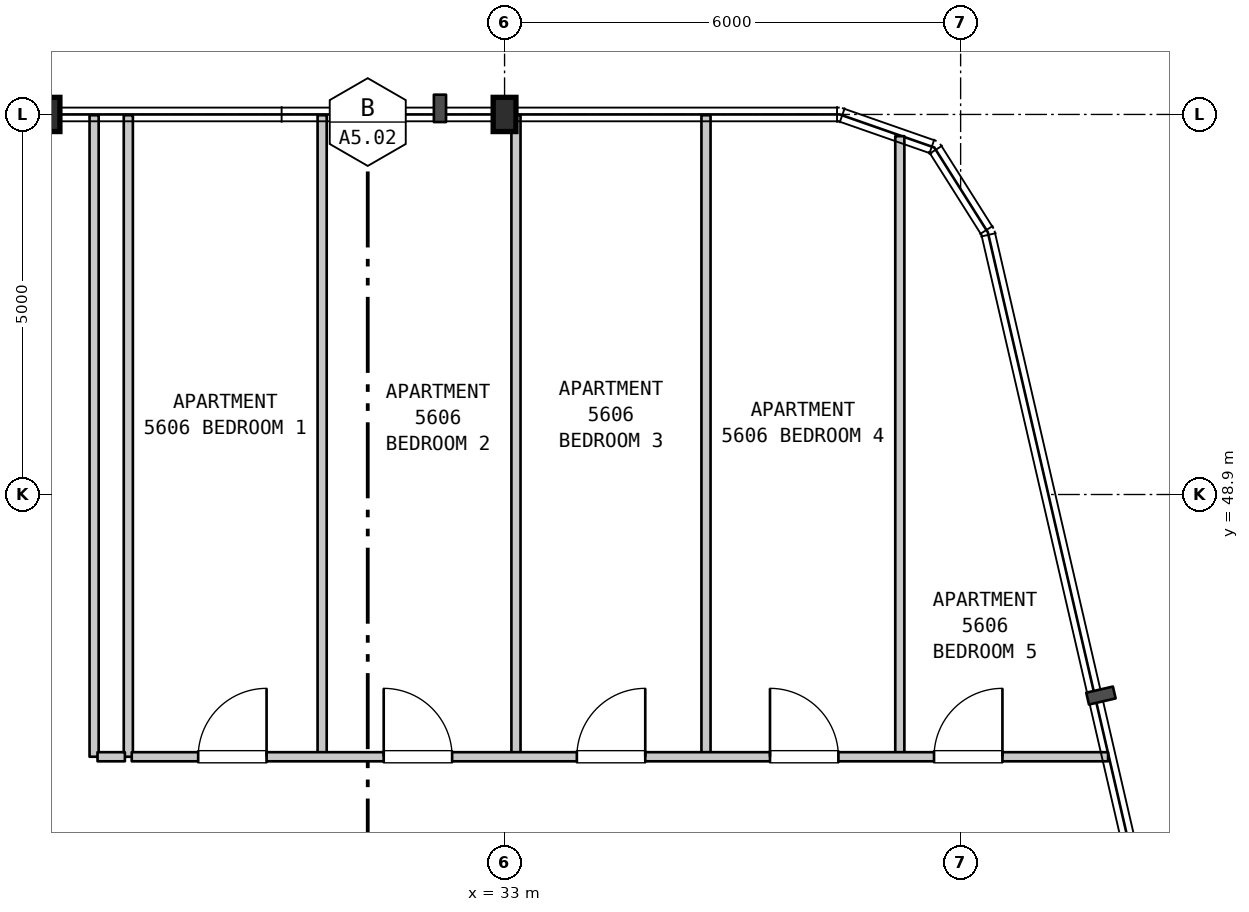
"""IFC4 building model, lengths in metres.
Left out: names, types, materials, properties, quantities, classifications, styles, units other than length and angle.
Written with IfcOpenShell. Run it as: python <this file> out.ifc"""

import sys

from ifc_helpers import new_model, si_unit, direction, frame, frame_2d, origin, origin_2d, place, context, subcontext, project, spatial, rectangle, i_section, extrude, element, fill, save


model = new_model("IFC4")
c1 = context("Model", 3, precision=1e-05, world=origin(), true_north=direction((0.0, 1.0)))
c2 = subcontext(c1, "Body", "Model", "MODEL_VIEW")
j1 = project(units=[si_unit("LENGTHUNIT", "METRE"), si_unit("PLANEANGLEUNIT", "RADIAN")], contexts=[c1])
p1 = place(None, origin())
s1 = spatial("IfcSite", under=j1, at=p1, CompositionType="ELEMENT")
p2 = place(p1, origin())
s2 = spatial("IfcBuilding", under=s1, at=p2, CompositionType="ELEMENT")
p3 = place(p2, frame((0.0, 0.0, 226.5)))
s3 = spatial("IfcBuildingStorey", under=s2, at=p3, CompositionType="ELEMENT", Elevation=226.5)
for number, where, z_axis, x_axis in (
    (1, (27.0, 53.9, 0.0), (0.0, 0.0, 1.0), (1.0, 0.0, 0.0)),
    (2, (33.0, 53.9, 0.0), (0.0, 0.0, 1.0), (1.0, 0.0, 0.0)),
):
    element("IfcColumn", number, at=place(p3, frame(where, z_axis=z_axis, x_axis=x_axis)), inside=s3, PredefinedType="COLUMN", context=c2, shape_type="SweptSolid", body=[
        extrude(i_section(OverallWidth=0.3, OverallDepth=0.45, WebThickness=0.014, FlangeThickness=0.026, FilletRadius=0.027, at=origin_2d()), origin(), (0.0, 0.0, 1.0), 3.7),
    ])
for number, where, z_axis, x_axis in (
    (3, (27.6, 45.45, 0.0), (0.0, 0.0, 1.0), (0.0, 1.0, 0.0)),
    (4, (28.05, 45.45, 0.0), (0.0, 0.0, 1.0), (0.0, 1.0, 0.0)),
    (5, (30.6, 45.45, 0.0), (0.0, 0.0, 1.0), (0.0, 1.0, 0.0)),
):
    element("IfcWall", number, at=place(p3, frame(where, z_axis=z_axis, x_axis=x_axis)), inside=s3, PredefinedType="PARTITIONING", context=c2, shape_type="SweptSolid", body=[
        extrude(rectangle(XDim=8.44, YDim=0.12, at=frame_2d((4.22, 0.0))), origin(), (0.0, 0.0, 1.0), 3.39),
    ])
p4 = place(p3, frame((33.15, 45.45, 0.0), z_axis=(0.0, 0.0, 1.0), x_axis=(0.0, 1.0, 0.0)))
e6 = element("IfcWall", 6, at=p4, inside=s3, PredefinedType="PARTITIONING", context=c2, shape_type="SweptSolid", body=[
    extrude(rectangle(XDim=8.44, YDim=0.12, at=frame_2d((4.22, 0.0))), origin(), (0.0, 0.0, 1.0), 2.79),
])
p5 = place(p3, frame((35.65, 45.45, 0.0), z_axis=(0.0, 0.0, 1.0), x_axis=(0.0, 1.0, 0.0)))
e7 = element("IfcWall", 7, at=p5, inside=s3, PredefinedType="PARTITIONING", context=c2, shape_type="SweptSolid", body=[
    extrude(rectangle(XDim=8.44, YDim=0.12, at=frame_2d((4.22, 0.0))), origin(), (0.0, 0.0, 1.0), 3.39),
])
p6 = place(p3, frame((38.2, 45.45, 0.0), z_axis=(0.0, 0.0, 1.0), x_axis=(0.0, 1.0, 0.0)))
e8 = element("IfcWall", 8, at=p6, inside=s3, PredefinedType="PARTITIONING", context=c2, shape_type="SweptSolid", body=[
    extrude(rectangle(XDim=8.164, YDim=0.12, at=frame_2d((4.082, 0.0))), origin(), (0.0, 0.0, 1.0), 3.39),
])
p7 = place(p3, frame((27.645, 45.45, 0.0), z_axis=(0.0, 0.0, 1.0), x_axis=(1.0, 0.0, 0.0)))
e9 = element("IfcWall", 9, at=p7, inside=s3, PredefinedType="PARTITIONING", context=c2, shape_type="SweptSolid", body=[
    extrude(rectangle(XDim=0.36, YDim=0.12, at=frame_2d((0.18, 0.0))), origin(), (0.0, 0.0, 1.0), 3.39),
])
p8 = place(p3, frame((28.095, 45.45, 0.0), z_axis=(0.0, 0.0, 1.0), x_axis=(1.0, 0.0, 0.0)))
e10 = element("IfcWall", 10, at=p8, inside=s3, PredefinedType="PARTITIONING", context=c2, shape_type="SweptSolid", body=[
    extrude(rectangle(XDim=12.845, YDim=0.12, at=frame_2d((6.422, 0.0))), origin(), (0.0, 0.0, 1.0), 3.39),
])
p9 = place(p8, frame((0.874, 0.0, 0.0)))
e11 = element("IfcOpeningElement", 11, at=p9, cuts=e10, PredefinedType="OPENING", context=c2, shape_type="SweptSolid", body=[
    extrude(rectangle(XDim=0.9, YDim=2.15, at=frame_2d((0.45, 1.075))), frame((0.0, 0.07, 0.0), z_axis=(0.0, -1.0, 0.0), x_axis=(1.0, 0.0, 0.0)), (0.0, 0.0, 1.0), 0.14),
])
p10 = place(p8, frame((3.315, 0.0, 0.0)))
e12 = element("IfcOpeningElement", 12, at=p10, cuts=e10, PredefinedType="OPENING", context=c2, shape_type="SweptSolid", body=[
    extrude(rectangle(XDim=0.9, YDim=2.15, at=frame_2d((0.45, 1.075))), frame((0.0, 0.07, 0.0), z_axis=(0.0, -1.0, 0.0), x_axis=(1.0, 0.0, 0.0)), (0.0, 0.0, 1.0), 0.14),
])
p11 = place(p8, frame((5.856, 0.0, 0.0)))
e13 = element("IfcOpeningElement", 13, at=p11, cuts=e10, PredefinedType="OPENING", context=c2, shape_type="SweptSolid", body=[
    extrude(rectangle(XDim=0.9, YDim=2.15, at=frame_2d((0.45, 1.075))), frame((0.0, 0.07, 0.0), z_axis=(0.0, -1.0, 0.0), x_axis=(1.0, 0.0, 0.0)), (0.0, 0.0, 1.0), 0.14),
])
p12 = place(p8, frame((8.397, 0.0, 0.0)))
e14 = element("IfcOpeningElement", 14, at=p12, cuts=e10, PredefinedType="OPENING", context=c2, shape_type="SweptSolid", body=[
    extrude(rectangle(XDim=0.9, YDim=2.15, at=frame_2d((0.45, 1.075))), frame((0.0, 0.07, 0.0), z_axis=(0.0, -1.0, 0.0), x_axis=(1.0, 0.0, 0.0)), (0.0, 0.0, 1.0), 0.14),
])
p13 = place(p8, frame((10.555, 0.0, 0.0)))
e15 = element("IfcOpeningElement", 15, at=p13, cuts=e10, PredefinedType="OPENING", context=c2, shape_type="SweptSolid", body=[
    extrude(rectangle(XDim=0.9, YDim=2.15, at=frame_2d((0.45, 1.075))), frame((0.0, 0.07, 0.0), z_axis=(0.0, -1.0, 0.0), x_axis=(1.0, 0.0, 0.0)), (0.0, 0.0, 1.0), 0.14),
])
p14 = place(p9, origin())
e16 = element("IfcDoor", 16, at=p14, inside=s3, OperationType="SINGLE_SWING_RIGHT", PredefinedType="DOOR", context=c2, shape_type="SweptSolid", body=[
    extrude(rectangle(XDim=0.9, YDim=2.15, at=frame_2d((0.45, 1.075))), frame((0.0, 0.025, 0.0), z_axis=(0.0, -1.0, 0.0), x_axis=(1.0, 0.0, 0.0)), (0.0, 0.0, 1.0), 0.05),
])
fill(e11, e16)
p15 = place(p10, origin())
e17 = element("IfcDoor", 17, at=p15, inside=s3, OperationType="SINGLE_SWING_LEFT", PredefinedType="DOOR", context=c2, shape_type="SweptSolid", body=[
    extrude(rectangle(XDim=0.9, YDim=2.15, at=frame_2d((0.45, 1.075))), frame((0.0, 0.025, 0.0), z_axis=(0.0, -1.0, 0.0), x_axis=(1.0, 0.0, 0.0)), (0.0, 0.0, 1.0), 0.05),
])
fill(e12, e17)
p16 = place(p11, origin())
e18 = element("IfcDoor", 18, at=p16, inside=s3, OperationType="SINGLE_SWING_RIGHT", PredefinedType="DOOR", context=c2, shape_type="SweptSolid", body=[
    extrude(rectangle(XDim=0.9, YDim=2.15, at=frame_2d((0.45, 1.075))), frame((0.0, 0.025, 0.0), z_axis=(0.0, -1.0, 0.0), x_axis=(1.0, 0.0, 0.0)), (0.0, 0.0, 1.0), 0.05),
])
fill(e13, e18)
p17 = place(p12, origin())
e19 = element("IfcDoor", 19, at=p17, inside=s3, OperationType="SINGLE_SWING_LEFT", PredefinedType="DOOR", context=c2, shape_type="SweptSolid", body=[
    extrude(rectangle(XDim=0.9, YDim=2.15, at=frame_2d((0.45, 1.075))), frame((0.0, 0.025, 0.0), z_axis=(0.0, -1.0, 0.0), x_axis=(1.0, 0.0, 0.0)), (0.0, 0.0, 1.0), 0.05),
])
fill(e14, e19)
p18 = place(p13, origin())
e20 = element("IfcDoor", 20, at=p18, inside=s3, OperationType="SINGLE_SWING_RIGHT", PredefinedType="DOOR", context=c2, shape_type="SweptSolid", body=[
    extrude(rectangle(XDim=0.9, YDim=2.15, at=frame_2d((0.45, 1.075))), frame((0.0, 0.025, 0.0), z_axis=(0.0, -1.0, 0.0), x_axis=(1.0, 0.0, 0.0)), (0.0, 0.0, 1.0), 0.05),
])
fill(e15, e20)
save(model, sys.argv[1])
